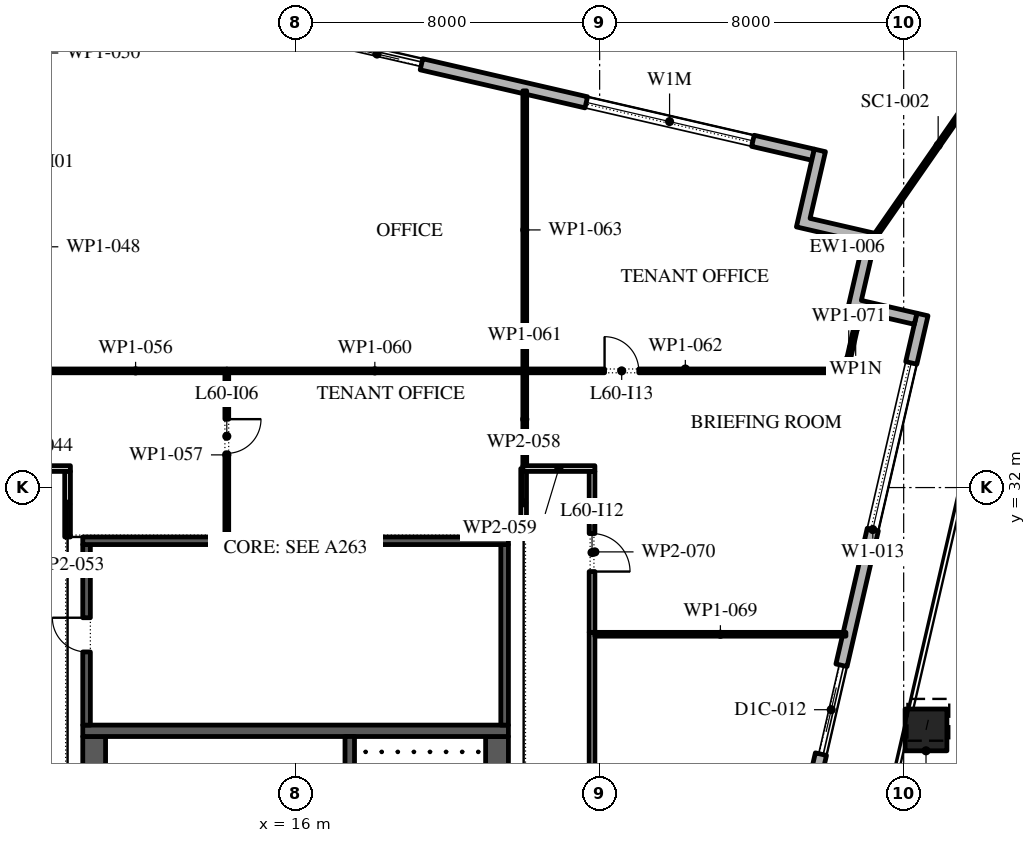
"""IFC4 building model, lengths in metres.
Left out: names, types, materials, properties, quantities, classifications, styles, units other than length and angle.
Written with IfcOpenShell. Run it as: python <this file> out.ifc"""

import sys

from ifc_helpers import new_model, si_unit, direction, frame, frame_2d, origin, origin_2d, place, context, subcontext, project, spatial, polyline, rectangle, outline, extrude, element, fill, save


model = new_model("IFC4")
c1 = context("Model", 3, precision=1e-05, world=origin(), true_north=direction((0.0, 1.0)))
c2 = subcontext(c1, "Body", "Model", "MODEL_VIEW")
j1 = project(units=[si_unit("LENGTHUNIT", "METRE"), si_unit("PLANEANGLEUNIT", "RADIAN")], contexts=[c1])
p1 = place(None, origin())
s1 = spatial("IfcSite", under=j1, at=p1, CompositionType="ELEMENT")
p2 = place(p1, origin())
s2 = spatial("IfcBuilding", under=s1, at=p2, CompositionType="ELEMENT")
p3 = place(p2, frame((0.0, 0.0, 276.6)))
s3 = spatial("IfcBuildingStorey", under=s2, at=p3, CompositionType="ELEMENT", Elevation=276.6)
p4 = place(p3, frame((32.588, 25.623, 0.0), z_axis=(0.014559788571, 0.063169759976, 0.997896584813), x_axis=(-0.97445148511, 0.224598092528, 0.0)))
e1 = element("IfcColumn", 1, at=p4, inside=s3, PredefinedType="COLUMN", context=c2, shape_type="SweptSolid", body=[
    extrude(rectangle(XDim=1.1, YDim=1.1, at=origin_2d()), origin(), (0.0, 0.0, 1.0), 4.209),
])
p5 = place(p3, frame((21.359, -11.678, 0.0), z_axis=(0.0, 0.0, 1.0), x_axis=(0.224949198343, 0.974370493275, 0.0)))
e2 = element("IfcWall", 2, at=p5, inside=s3, PredefinedType="STANDARD", context=c2, shape_type="SweptSolid", body=[
    extrude(rectangle(XDim=49.5, YDim=0.3, at=frame_2d((24.75, 0.0))), origin(), (0.0, 0.0, 1.0), 4.0),
])
p6 = place(p5, frame((1.157, 0.0, 0.45)))
e3 = element("IfcOpeningElement", 3, at=p6, cuts=e2, PredefinedType="OPENING", context=c2, shape_type="SweptSolid", body=[
    extrude(rectangle(XDim=4.5, YDim=3.05, at=frame_2d((2.25, 1.525))), frame((0.0, 0.16, 0.0), z_axis=(0.0, -1.0, 0.0), x_axis=(1.0, 0.0, 0.0)), (0.0, 0.0, 1.0), 0.32),
])
p7 = place(p5, frame((8.121, 0.0, 0.45)))
e4 = element("IfcOpeningElement", 4, at=p7, cuts=e2, PredefinedType="OPENING", context=c2, shape_type="SweptSolid", body=[
    extrude(rectangle(XDim=4.5, YDim=3.05, at=frame_2d((2.25, 1.525))), frame((0.0, 0.16, 0.0), z_axis=(0.0, -1.0, 0.0), x_axis=(1.0, 0.0, 0.0)), (0.0, 0.0, 1.0), 0.32),
])
p8 = place(p5, frame((15.236, 0.0, 0.45)))
e5 = element("IfcOpeningElement", 5, at=p8, cuts=e2, PredefinedType="OPENING", context=c2, shape_type="SweptSolid", body=[
    extrude(rectangle(XDim=4.5, YDim=3.05, at=frame_2d((2.25, 1.525))), frame((0.0, 0.16, 0.0), z_axis=(0.0, -1.0, 0.0), x_axis=(1.0, 0.0, 0.0)), (0.0, 0.0, 1.0), 0.32),
])
p9 = place(p5, frame((22.35, 0.0, 0.45)))
e6 = element("IfcOpeningElement", 6, at=p9, cuts=e2, PredefinedType="OPENING", context=c2, shape_type="SweptSolid", body=[
    extrude(rectangle(XDim=4.5, YDim=3.05, at=frame_2d((2.25, 1.525))), frame((0.0, 0.16, 0.0), z_axis=(0.0, -1.0, 0.0), x_axis=(1.0, 0.0, 0.0)), (0.0, 0.0, 1.0), 0.32),
])
p10 = place(p5, frame((29.464, 0.0, 0.45)))
e7 = element("IfcOpeningElement", 7, at=p10, cuts=e2, PredefinedType="OPENING", context=c2, shape_type="SweptSolid", body=[
    extrude(rectangle(XDim=4.5, YDim=2.95, at=frame_2d((2.25, 1.475))), frame((0.0, 0.16, 0.0), z_axis=(0.0, -1.0, 0.0), x_axis=(1.0, 0.0, 0.0)), (0.0, 0.0, 1.0), 0.32),
])
p11 = place(p5, frame((37.628, 0.0, 0.0)))
e8 = element("IfcOpeningElement", 8, at=p11, cuts=e2, PredefinedType="OPENING", context=c2, shape_type="SweptSolid", body=[
    extrude(rectangle(XDim=2.4, YDim=3.325, at=frame_2d((1.2, 1.663))), frame((0.0, 0.16, 0.0), z_axis=(0.0, -1.0, 0.0), x_axis=(1.0, 0.0, 0.0)), (0.0, 0.0, 1.0), 0.32),
])
p12 = place(p5, frame((43.693, 0.0, 0.45)))
e9 = element("IfcOpeningElement", 9, at=p12, cuts=e2, PredefinedType="OPENING", context=c2, shape_type="SweptSolid", body=[
    extrude(rectangle(XDim=4.5, YDim=3.05, at=frame_2d((2.25, 1.525))), frame((0.0, 0.16, 0.0), z_axis=(0.0, -1.0, 0.0), x_axis=(1.0, 0.0, 0.0)), (0.0, 0.0, 1.0), 0.32),
])
p13 = place(p3, frame((29.616, 40.758, 0.0), z_axis=(0.0, 0.0, 1.0), x_axis=(-0.974370532314, 0.224949029246, 0.0)))
e10 = element("IfcWall", 10, at=p13, inside=s3, PredefinedType="STANDARD", context=c2, shape_type="SweptSolid", body=[
    extrude(rectangle(XDim=48.0, YDim=0.3, at=frame_2d((24.0, 0.0))), origin(), (0.0, 0.0, 1.0), 4.0),
])
p14 = place(p13, frame((1.625, 0.0, 0.45)))
e11 = element("IfcOpeningElement", 11, at=p14, cuts=e10, PredefinedType="OPENING", context=c2, shape_type="SweptSolid", body=[
    extrude(rectangle(XDim=4.5, YDim=2.575, at=frame_2d((2.25, 1.288))), frame((0.0, 0.16, 0.0), z_axis=(0.0, -1.0, 0.0), x_axis=(1.0, 0.0, 0.0)), (0.0, 0.0, 1.0), 0.32),
])
p15 = place(p13, frame((10.575, 0.0, 0.0)))
e12 = element("IfcOpeningElement", 12, at=p15, cuts=e10, PredefinedType="OPENING", context=c2, shape_type="SweptSolid", body=[
    extrude(rectangle(XDim=2.4, YDim=3.5, at=frame_2d((1.2, 1.75))), frame((0.0, 0.16, 0.0), z_axis=(0.0, -1.0, 0.0), x_axis=(1.0, 0.0, 0.0)), (0.0, 0.0, 1.0), 0.32),
])
p16 = place(p13, frame((17.575, 0.0, 0.45)))
e13 = element("IfcOpeningElement", 13, at=p16, cuts=e10, PredefinedType="OPENING", context=c2, shape_type="SweptSolid", body=[
    extrude(rectangle(XDim=4.5, YDim=2.45, at=frame_2d((2.25, 1.225))), frame((0.0, 0.16, 0.0), z_axis=(0.0, -1.0, 0.0), x_axis=(1.0, 0.0, 0.0)), (0.0, 0.0, 1.0), 0.32),
])
p17 = place(p13, frame((25.625, 0.0, 0.45)))
e14 = element("IfcOpeningElement", 14, at=p17, cuts=e10, PredefinedType="OPENING", context=c2, shape_type="SweptSolid", body=[
    extrude(rectangle(XDim=4.5, YDim=2.45, at=frame_2d((2.25, 1.225))), frame((0.0, 0.16, 0.0), z_axis=(0.0, -1.0, 0.0), x_axis=(1.0, 0.0, 0.0)), (0.0, 0.0, 1.0), 0.32),
])
p18 = place(p13, frame((33.675, 0.0, 0.45)))
e15 = element("IfcOpeningElement", 15, at=p18, cuts=e10, PredefinedType="OPENING", context=c2, shape_type="SweptSolid", body=[
    extrude(rectangle(XDim=4.5, YDim=2.45, at=frame_2d((2.25, 1.225))), frame((0.0, 0.16, 0.0), z_axis=(0.0, -1.0, 0.0), x_axis=(1.0, 0.0, 0.0)), (0.0, 0.0, 1.0), 0.32),
])
p19 = place(p13, frame((42.175, 0.0, 0.0)))
e16 = element("IfcOpeningElement", 16, at=p19, cuts=e10, PredefinedType="OPENING", context=c2, shape_type="SweptSolid", body=[
    extrude(rectangle(XDim=2.4, YDim=3.5, at=frame_2d((1.2, 1.75))), frame((0.0, 0.16, 0.0), z_axis=(0.0, -1.0, 0.0), x_axis=(1.0, 0.0, 0.0)), (0.0, 0.0, 1.0), 0.32),
])
p20 = place(p3, origin())
e17 = element("IfcWall", 17, at=p20, inside=s3, PredefinedType="STANDARD", context=c2, shape_type="SweptSolid", body=[
    extrude(outline(polyline([(30.931, 38.453), (29.177, 38.858), (29.65, 40.905), (29.942, 40.837), (29.537, 39.083), (31.291, 38.678), (30.886, 36.924), (32.348, 36.587), (32.28, 36.295), (30.526, 36.699), (30.931, 38.453)])), origin(), (0.0, 0.0, 1.0), 4.0),
])
p21 = place(p3, frame((31.291, 38.678, -0.05), z_axis=(0.0, 0.0, 1.0), x_axis=(0.570748735076, 0.821124766043, 0.0)))
e18 = element("IfcWall", 18, at=p21, inside=s3, PredefinedType="STANDARD", context=c2, shape_type="SweptSolid", body=[
    extrude(rectangle(XDim=5.664, YDim=0.1, at=frame_2d((2.832, 0.0))), origin(), (0.0, 0.0, 1.0), 4.05),
])
p22 = place(p3, frame((21.3, -2.45, 0.0), z_axis=(0.0, 0.0, 1.0), x_axis=(0.0, 1.0, 0.0)))
e19 = element("IfcWall", 19, at=p22, inside=s3, PredefinedType="SHEAR", context=c2, shape_type="SweptSolid", body=[
    extrude(rectangle(XDim=27.9, YDim=0.6, at=frame_2d((13.95, 0.0))), origin(), (0.0, 0.0, 1.0), 4.0),
])
p23 = place(p22, frame((5.05, 0.0, 0.0)))
e20 = element("IfcOpeningElement", 20, at=p23, cuts=e19, PredefinedType="OPENING", context=c2, shape_type="SweptSolid", body=[
    extrude(rectangle(XDim=1.2, YDim=2.1, at=frame_2d((0.6, 1.05))), frame((0.0, 0.31, 0.0), z_axis=(0.0, -1.0, 0.0), x_axis=(1.0, 0.0, 0.0)), (0.0, 0.0, 1.0), 0.62),
])
p24 = place(p22, frame((21.65, 0.0, 0.0)))
e21 = element("IfcOpeningElement", 21, at=p24, cuts=e19, PredefinedType="OPENING", context=c2, shape_type="SweptSolid", body=[
    extrude(rectangle(XDim=1.2, YDim=2.1, at=frame_2d((0.6, 1.05))), frame((0.0, 0.31, 0.0), z_axis=(0.0, -1.0, 0.0), x_axis=(1.0, 0.0, 0.0)), (0.0, 0.0, 1.0), 0.62),
])
p25 = place(p3, frame((10.7, -2.45, 0.0), z_axis=(0.0, 0.0, 1.0), x_axis=(0.0, 1.0, 0.0)))
e22 = element("IfcWall", 22, at=p25, inside=s3, PredefinedType="SHEAR", context=c2, shape_type="SweptSolid", body=[
    extrude(rectangle(XDim=27.9, YDim=0.6, at=frame_2d((13.95, 0.0))), origin(), (0.0, 0.0, 1.0), 4.0),
])
p26 = place(p25, frame((23.65, 0.0, 0.0)))
e23 = element("IfcOpeningElement", 23, at=p26, cuts=e22, PredefinedType="OPENING", context=c2, shape_type="SweptSolid", body=[
    extrude(rectangle(XDim=2.4, YDim=2.1, at=frame_2d((1.2, 1.05))), frame((0.0, 0.31, 0.0), z_axis=(0.0, -1.0, 0.0), x_axis=(1.0, 0.0, 0.0)), (0.0, 0.0, 1.0), 0.62),
])
p27 = place(p25, frame((0.788, 0.0, 0.0)))
e24 = element("IfcOpeningElement", 24, at=p27, cuts=e22, PredefinedType="OPENING", context=c2, shape_type="SweptSolid", body=[
    extrude(rectangle(XDim=0.9, YDim=2.1, at=frame_2d((0.45, 1.05))), frame((0.0, 0.31, 0.0), z_axis=(0.0, -1.0, 0.0), x_axis=(1.0, 0.0, 0.0)), (0.0, 0.0, 1.0), 0.62),
])
p28 = place(p25, frame((3.962, 0.0, 0.0)))
e25 = element("IfcOpeningElement", 25, at=p28, cuts=e22, PredefinedType="OPENING", context=c2, shape_type="SweptSolid", body=[
    extrude(rectangle(XDim=1.0, YDim=2.1, at=frame_2d((0.5, 1.05))), frame((0.0, 0.31, 0.0), z_axis=(0.0, -1.0, 0.0), x_axis=(1.0, 0.0, 0.0)), (0.0, 0.0, 1.0), 0.62),
])
p29 = place(p3, frame((10.4, 25.6, 0.0), z_axis=(0.0, 0.0, 1.0), x_axis=(1.0, 0.0, 0.0)))
e26 = element("IfcWall", 26, at=p29, inside=s3, PredefinedType="SHEAR", context=c2, shape_type="SweptSolid", body=[
    extrude(rectangle(XDim=11.2, YDim=0.3, at=frame_2d((5.6, 0.0))), origin(), (0.0, 0.0, 1.0), 4.0),
])
p30 = place(p3, frame((17.425, 19.15, 0.0), z_axis=(0.0, 0.0, 1.0), x_axis=(0.0, 1.0, 0.0)))
e27 = element("IfcWall", 27, at=p30, inside=s3, PredefinedType="SHEAR", context=c2, shape_type="SweptSolid", body=[
    extrude(rectangle(XDim=6.3, YDim=0.25, at=frame_2d((3.15, 0.0))), origin(), (0.0, 0.0, 1.0), 4.0),
])
p31 = place(p30, frame((0.05, 0.0, 0.0)))
e28 = element("IfcOpeningElement", 28, at=p31, cuts=e27, PredefinedType="OPENING", context=c2, shape_type="SweptSolid", body=[
    extrude(rectangle(XDim=1.2, YDim=2.1, at=frame_2d((0.6, 1.05))), frame((0.0, 0.135, 0.0), z_axis=(0.0, -1.0, 0.0), x_axis=(1.0, 0.0, 0.0)), (0.0, 0.0, 1.0), 0.27),
])
p32 = place(p3, frame((21.5, 25.75, 0.0), z_axis=(0.0, 0.0, 1.0), x_axis=(0.0, 1.0, 0.0)))
e29 = element("IfcWall", 29, at=p32, inside=s3, PredefinedType="SHEAR", context=c2, shape_type="SweptSolid", body=[
    extrude(rectangle(XDim=4.75, YDim=0.2, at=frame_2d((2.375, 0.0))), origin(), (0.0, 0.0, 1.0), 4.0),
])
p33 = place(p3, frame((10.5, 25.75, 0.0), z_axis=(0.0, 0.0, 1.0), x_axis=(0.0, 1.0, 0.0)))
e30 = element("IfcWall", 30, at=p33, inside=s3, PredefinedType="SHEAR", context=c2, shape_type="SweptSolid", body=[
    extrude(rectangle(XDim=4.75, YDim=0.2, at=frame_2d((2.375, 0.0))), origin(), (0.0, 0.0, 1.0), 4.0),
])
p34 = place(p33, frame((1.925, 0.0, 0.0)))
e31 = element("IfcOpeningElement", 31, at=p34, cuts=e30, PredefinedType="OPENING", context=c2, shape_type="SweptSolid", body=[
    extrude(rectangle(XDim=0.9, YDim=2.1, at=frame_2d((0.45, 1.05))), frame((0.0, 0.11, 0.0), z_axis=(0.0, -1.0, 0.0), x_axis=(1.0, 0.0, 0.0)), (0.0, 0.0, 1.0), 0.22),
])
p35 = place(p3, frame((10.4, 30.6, 0.0), z_axis=(0.0, 0.0, 1.0), x_axis=(1.0, 0.0, 0.0)))
e32 = element("IfcWall", 32, at=p35, inside=s3, PredefinedType="SHEAR", context=c2, shape_type="SweptSolid", body=[
    extrude(rectangle(XDim=11.2, YDim=0.2, at=frame_2d((5.6, 0.0))), origin(), (0.0, 0.0, 1.0), 4.0),
])
p36 = place(p3, frame((8.275, 32.5, 0.0), z_axis=(0.0, 0.0, 1.0), x_axis=(1.0, 0.0, 0.0)))
e33 = element("IfcWall", 33, at=p36, inside=s3, PredefinedType="PARTITIONING", context=c2, shape_type="SweptSolid", body=[
    extrude(rectangle(XDim=1.8, YDim=0.15, at=frame_2d((0.9, 0.0))), origin(), (0.0, 0.0, 1.0), 4.0),
])
p37 = place(p3, frame((10.0, 32.425, 0.0), z_axis=(0.0, 0.0, 1.0), x_axis=(0.0, -1.0, 0.0)))
e34 = element("IfcWall", 34, at=p37, inside=s3, PredefinedType="PARTITIONING", context=c2, shape_type="SweptSolid", body=[
    extrude(rectangle(XDim=1.725, YDim=0.15, at=frame_2d((0.863, 0.0))), origin(), (0.0, 0.0, 1.0), 4.0),
])
p38 = place(p3, frame((14.19, 35.07, 0.0), z_axis=(0.0, 0.0, 1.0), x_axis=(-1.0, 0.0, 0.0)))
e35 = element("IfcWall", 35, at=p38, inside=s3, PredefinedType="PARTITIONING", context=c2, shape_type="SweptSolid", body=[
    extrude(rectangle(XDim=4.8, YDim=0.1, at=frame_2d((2.4, 0.0))), origin(), (0.0, 0.0, 1.0), 4.0),
])
p39 = place(p3, frame((14.19, 35.02, 0.0), z_axis=(0.0, 0.0, 1.0), x_axis=(0.0, -1.0, 0.0)))
e36 = element("IfcWall", 36, at=p39, inside=s3, PredefinedType="PARTITIONING", context=c2, shape_type="SweptSolid", body=[
    extrude(rectangle(XDim=4.32, YDim=0.1, at=frame_2d((2.16, 0.0))), origin(), (0.0, 0.0, 1.0), 4.0),
])
p40 = place(p39, frame((1.22, 0.0, 0.0)))
e37 = element("IfcOpeningElement", 37, at=p40, cuts=e36, PredefinedType="OPENING", context=c2, shape_type="SweptSolid", body=[
    extrude(rectangle(XDim=0.9, YDim=2.1, at=frame_2d((0.45, 1.05))), frame((0.0, 0.06, 0.0), z_axis=(0.0, -1.0, 0.0), x_axis=(1.0, 0.0, 0.0)), (0.0, 0.0, 1.0), 0.12),
])
p41 = place(p3, frame((22.0, 30.7, 0.0), z_axis=(0.0, 0.0, 1.0), x_axis=(0.0, 1.0, 0.0)))
e38 = element("IfcWall", 38, at=p41, inside=s3, PredefinedType="PARTITIONING", context=c2, shape_type="SweptSolid", body=[
    extrude(rectangle(XDim=1.8, YDim=0.15, at=frame_2d((0.9, 0.0))), origin(), (0.0, 0.0, 1.0), 4.0),
])
p42 = place(p3, frame((21.98, 32.5, 0.0), z_axis=(0.0, 0.0, 1.0), x_axis=(1.0, 0.0, 0.0)))
e39 = element("IfcWall", 39, at=p42, inside=s3, PredefinedType="PARTITIONING", context=c2, shape_type="SweptSolid", body=[
    extrude(rectangle(XDim=1.895, YDim=0.15, at=frame_2d((0.948, 0.0))), origin(), (0.0, 0.0, 1.0), 4.0),
])
p43 = place(p3, frame((21.98, 35.07, 0.0), z_axis=(0.0, 0.0, 1.0), x_axis=(-1.0, 0.0, 0.0)))
e40 = element("IfcWall", 40, at=p43, inside=s3, PredefinedType="PARTITIONING", context=c2, shape_type="SweptSolid", body=[
    extrude(rectangle(XDim=7.79, YDim=0.1, at=frame_2d((3.895, 0.0))), origin(), (0.0, 0.0, 1.0), 4.0),
])
p44 = place(p3, frame((22.03, 35.02, 0.0), z_axis=(0.0, 0.0, 1.0), x_axis=(0.0, -1.0, 0.0)))
e41 = element("IfcWall", 41, at=p44, inside=s3, PredefinedType="PARTITIONING", context=c2, shape_type="SweptSolid", body=[
    extrude(rectangle(XDim=2.445, YDim=0.1, at=frame_2d((1.223, 0.0))), origin(), (0.0, 0.0, 1.0), 4.0),
])
p45 = place(p3, frame((21.98, 35.07, 0.0), z_axis=(0.0, 0.0, 1.0), x_axis=(1.0, 0.0, 0.0)))
e42 = element("IfcWall", 42, at=p45, inside=s3, PredefinedType="PARTITIONING", context=c2, shape_type="SweptSolid", body=[
    extrude(rectangle(XDim=8.55, YDim=0.1, at=frame_2d((4.275, 0.0))), origin(), (0.0, 0.0, 1.0), 4.0),
])
p46 = place(p45, frame((2.15, 0.0, 0.0)))
e43 = element("IfcOpeningElement", 43, at=p46, cuts=e42, PredefinedType="OPENING", context=c2, shape_type="SweptSolid", body=[
    extrude(rectangle(XDim=0.9, YDim=2.1, at=frame_2d((0.45, 1.05))), frame((0.0, 0.06, 0.0), z_axis=(0.0, -1.0, 0.0), x_axis=(1.0, 0.0, 0.0)), (0.0, 0.0, 1.0), 0.12),
])
p47 = place(p3, frame((22.03, 42.438, 0.0), z_axis=(0.0, 0.0, 1.0), x_axis=(0.0, -1.0, 0.0)))
e44 = element("IfcWall", 44, at=p47, inside=s3, PredefinedType="PARTITIONING", context=c2, shape_type="SweptSolid", body=[
    extrude(rectangle(XDim=7.318, YDim=0.1, at=frame_2d((3.659, 0.0))), origin(), (0.0, 0.0, 1.0), 4.0),
])
p48 = place(p3, frame((23.8, 28.19, 0.0), z_axis=(0.0, 0.0, 1.0), x_axis=(0.0, -1.0, 0.0)))
e45 = element("IfcWall", 45, at=p48, inside=s3, PredefinedType="PARTITIONING", context=c2, shape_type="SweptSolid", body=[
    extrude(rectangle(XDim=12.35, YDim=0.15, at=frame_2d((6.175, 0.0))), origin(), (0.0, 0.0, 1.0), 4.0),
])
p49 = place(p48, frame((8.25, 0.0, 0.0)))
e46 = element("IfcOpeningElement", 46, at=p49, cuts=e45, PredefinedType="OPENING", context=c2, shape_type="SweptSolid", body=[
    extrude(rectangle(XDim=1.0, YDim=2.1, at=frame_2d((0.5, 1.05))), frame((0.0, 0.085, 0.0), z_axis=(0.0, -1.0, 0.0), x_axis=(1.0, 0.0, 0.0)), (0.0, 0.0, 1.0), 0.17),
])
p50 = place(p3, frame((23.875, 28.14, 0.0), z_axis=(0.0, 0.0, 1.0), x_axis=(1.0, 0.0, 0.0)))
e47 = element("IfcWall", 47, at=p50, inside=s3, PredefinedType="PARTITIONING", context=c2, shape_type="SweptSolid", body=[
    extrude(rectangle(XDim=6.605, YDim=0.1, at=frame_2d((3.302, 0.0))), origin(), (0.0, 0.0, 1.0), 4.0),
])
p51 = place(p3, frame((23.8, 32.425, 0.0), z_axis=(0.0, 0.0, 1.0), x_axis=(0.0, -1.0, 0.0)))
e48 = element("IfcWall", 48, at=p51, inside=s3, PredefinedType="PARTITIONING", context=c2, shape_type="SweptSolid", body=[
    extrude(rectangle(XDim=4.235, YDim=0.15, at=frame_2d((2.118, 0.0))), origin(), (0.0, 0.0, 1.0), 4.0),
])
p52 = place(p51, frame((1.635, 0.0, 0.0)))
e49 = element("IfcOpeningElement", 49, at=p52, cuts=e48, PredefinedType="OPENING", context=c2, shape_type="SweptSolid", body=[
    extrude(rectangle(XDim=1.0, YDim=2.1, at=frame_2d((0.5, 1.05))), frame((0.0, 0.085, 0.0), z_axis=(0.0, -1.0, 0.0), x_axis=(1.0, 0.0, 0.0)), (0.0, 0.0, 1.0), 0.17),
])
p53 = place(p3, frame((30.491, 35.119, 0.0), z_axis=(0.0, 0.0, 1.0), x_axis=(0.221364977912, 0.975191030801, 0.0)))
e50 = element("IfcWall", 50, at=p53, inside=s3, PredefinedType="PARTITIONING", context=c2, shape_type="SweptSolid", body=[
    extrude(rectangle(XDim=0.577, YDim=0.1, at=frame_2d((0.289, 0.0))), origin(), (0.0, 0.0, 1.0), 4.0),
])
p54 = place(p3, frame((30.619, 35.681, 0.0), z_axis=(0.0, 0.0, 1.0), x_axis=(0.221512751938, 0.975157474836, 0.0)))
e51 = element("IfcWall", 51, at=p54, inside=s3, PredefinedType="PARTITIONING", context=c2, shape_type="SweptSolid", body=[
    extrude(rectangle(XDim=1.071, YDim=0.1, at=frame_2d((0.536, 0.0))), origin(), (0.0, 0.0, 1.0), 3.164),
])
p55 = place(p11, origin())
e52 = element("IfcDoor", 52, at=p55, inside=s3, OperationType="DOUBLE_DOOR_SLIDING", PredefinedType="DOOR", context=c2, shape_type="SweptSolid", body=[
    extrude(rectangle(XDim=2.4, YDim=3.325, at=frame_2d((1.2, 1.663))), frame((0.0, 0.025, 0.0), z_axis=(0.0, -1.0, 0.0), x_axis=(1.0, 0.0, 0.0)), (0.0, 0.0, 1.0), 0.05),
])
fill(e8, e52)
p56 = place(p12, origin())
e53 = element("IfcWindow", 53, at=p56, inside=s3, PartitioningType="DOUBLE_PANEL_VERTICAL", PredefinedType="WINDOW", context=c2, shape_type="SweptSolid", body=[
    extrude(rectangle(XDim=4.5, YDim=3.05, at=frame_2d((2.25, 1.525))), frame((0.0, 0.03, 0.0), z_axis=(0.0, -1.0, 0.0), x_axis=(1.0, 0.0, 0.0)), (0.0, 0.0, 1.0), 0.06),
])
fill(e9, e53)
p57 = place(p14, origin())
e54 = element("IfcWindow", 54, at=p57, inside=s3, PartitioningType="DOUBLE_PANEL_VERTICAL", PredefinedType="WINDOW", context=c2, shape_type="SweptSolid", body=[
    extrude(rectangle(XDim=4.5, YDim=2.575, at=frame_2d((2.25, 1.288))), frame((0.0, 0.03, 0.0), z_axis=(0.0, -1.0, 0.0), x_axis=(1.0, 0.0, 0.0)), (0.0, 0.0, 1.0), 0.06),
])
fill(e11, e54)
p58 = place(p15, origin())
e55 = element("IfcDoor", 55, at=p58, inside=s3, OperationType="DOUBLE_DOOR_SLIDING", PredefinedType="DOOR", context=c2, shape_type="SweptSolid", body=[
    extrude(rectangle(XDim=2.4, YDim=3.5, at=frame_2d((1.2, 1.75))), frame((0.0, 0.025, 0.0), z_axis=(0.0, -1.0, 0.0), x_axis=(1.0, 0.0, 0.0)), (0.0, 0.0, 1.0), 0.05),
])
fill(e12, e55)
p59 = place(p34, origin())
e56 = element("IfcDoor", 56, at=p59, inside=s3, OperationType="SINGLE_SWING_LEFT", PredefinedType="DOOR", context=c2, shape_type="SweptSolid", body=[
    extrude(rectangle(XDim=0.9, YDim=2.1, at=frame_2d((0.45, 1.05))), frame((0.0, -0.05, 0.0), z_axis=(0.0, -1.0, 0.0), x_axis=(1.0, 0.0, 0.0)), (0.0, 0.0, 1.0), 0.05),
])
fill(e31, e56)
p60 = place(p40, origin())
e57 = element("IfcDoor", 57, at=p60, inside=s3, OperationType="SINGLE_SWING_RIGHT", PredefinedType="DOOR", context=c2, shape_type="SweptSolid", body=[
    extrude(rectangle(XDim=0.9, YDim=2.1, at=frame_2d((0.45, 1.05))), frame((0.0, 0.025, 0.0), z_axis=(0.0, -1.0, 0.0), x_axis=(1.0, 0.0, 0.0)), (0.0, 0.0, 1.0), 0.05),
])
fill(e37, e57)
p61 = place(p52, origin())
e58 = element("IfcDoor", 58, at=p61, inside=s3, OperationType="SINGLE_SWING_LEFT", PredefinedType="DOOR", context=c2, shape_type="SweptSolid", body=[
    extrude(rectangle(XDim=1.0, YDim=2.1, at=frame_2d((0.5, 1.05))), frame((0.0, 0.025, 0.0), z_axis=(0.0, -1.0, 0.0), x_axis=(1.0, 0.0, 0.0)), (0.0, 0.0, 1.0), 0.05),
])
fill(e49, e58)
p62 = place(p46, origin())
e59 = element("IfcDoor", 59, at=p62, inside=s3, OperationType="SINGLE_SWING_RIGHT", PredefinedType="DOOR", context=c2, shape_type="SweptSolid", body=[
    extrude(rectangle(XDim=0.9, YDim=2.1, at=frame_2d((0.45, 1.05))), frame((0.0, 0.025, 0.0), z_axis=(0.0, -1.0, 0.0), x_axis=(1.0, 0.0, 0.0)), (0.0, 0.0, 1.0), 0.05),
])
fill(e43, e59)
save(model, sys.argv[1])
